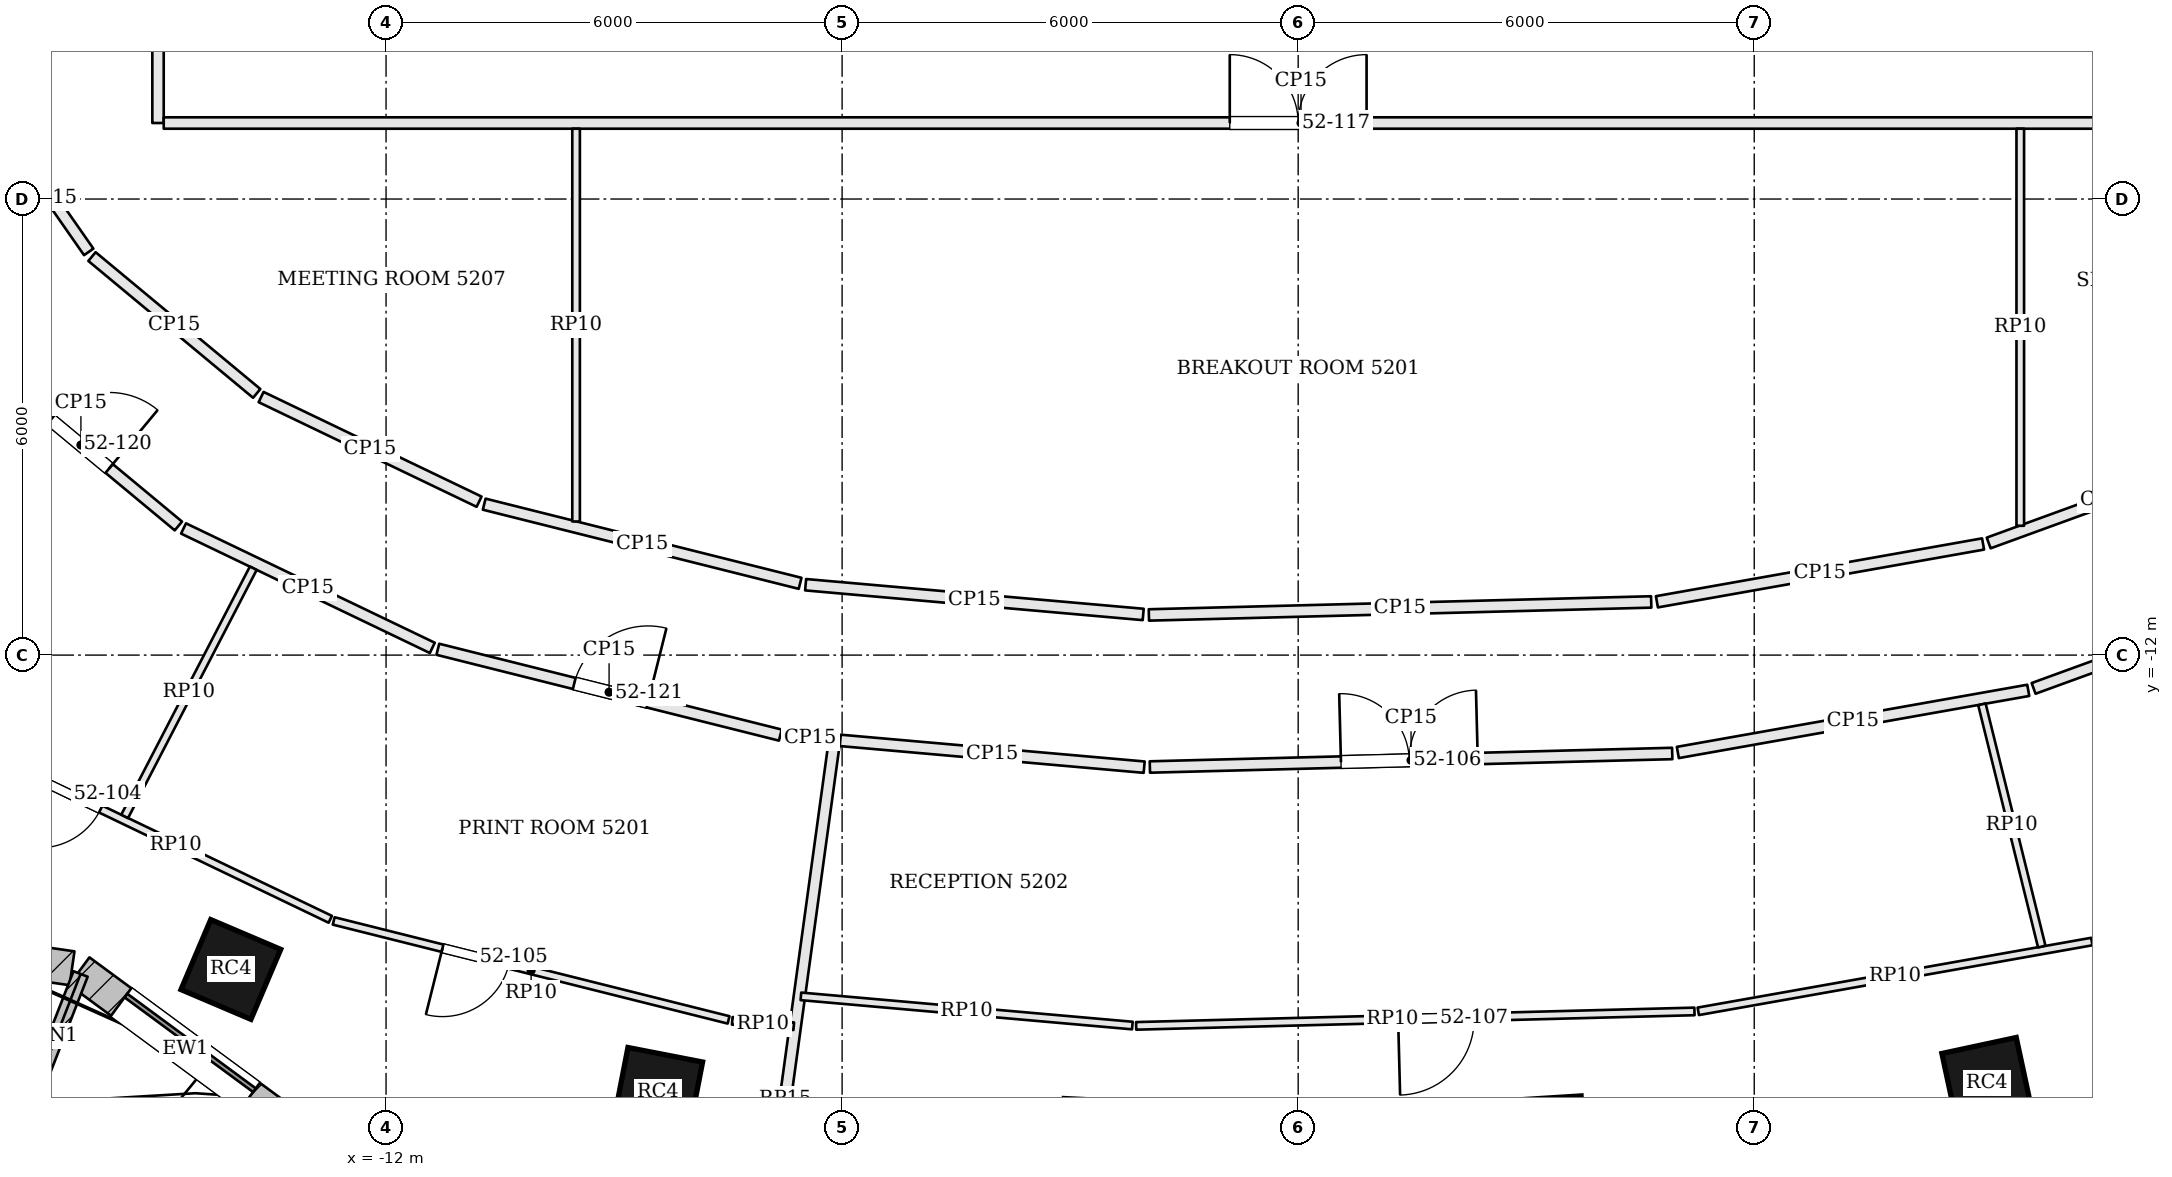
"""IFC4 building model, lengths in metres.
Left out: names, types, materials, properties, quantities, classifications, styles, units other than length and angle.
Written with IfcOpenShell. Run it as: python <this file> out.ifc"""

import sys

from ifc_helpers import new_model, si_unit, direction, frame, frame_2d, origin, origin_2d, place, context, subcontext, project, spatial, rectangle, extrude, element, fill, save


model = new_model("IFC4")
c1 = context("Model", 3, precision=1e-05, world=origin(), true_north=direction((0.0, 1.0)))
c2 = subcontext(c1, "Body", "Model", "MODEL_VIEW")
j1 = project(units=[si_unit("LENGTHUNIT", "METRE"), si_unit("PLANEANGLEUNIT", "RADIAN")], contexts=[c1])
p1 = place(None, origin())
s1 = spatial("IfcSite", under=j1, at=p1, CompositionType="ELEMENT")
p2 = place(p1, origin())
s2 = spatial("IfcBuilding", under=s1, at=p2, CompositionType="ELEMENT")
p3 = place(p2, frame((0.0, 0.0, 213.0)))
s3 = spatial("IfcBuildingStorey", under=s2, at=p3, CompositionType="ELEMENT", Elevation=213.0)
for number, where, z_axis, x_axis in (
    (1, (-14.042, -16.136, 0.0), (0.0, 0.0, 1.0), (0.92, -0.392, 0.0)),
    (2, (-8.422, -17.749, 0.0), (0.0, 0.0, 1.0), (0.982, -0.191, 0.0)),
    (3, (3.254, -18.33, 0.0), (0.0, 0.0, 1.0), (0.998, 0.063, 0.0)),
    (4, (9.063, -17.625, 0.0), (0.0, 0.0, 1.0), (0.978, 0.21, 0.0)),
):
    element("IfcColumn", number, at=place(p3, frame(where, z_axis=z_axis, x_axis=x_axis)), inside=s3, PredefinedType="COLUMN", context=c2, shape_type="SweptSolid", body=[
        extrude(rectangle(XDim=1.0, YDim=1.0, at=origin_2d()), origin(), (0.0, 0.0, 1.0), 3.9),
    ])
p4 = place(p3, frame((-21.825, -15.297, 0.0), z_axis=(0.0, 0.0, 1.0), x_axis=(0.98971474215, -0.143054986527, 0.0)))
e5 = element("IfcWall", 5, at=p4, inside=s3, PredefinedType="SOLIDWALL", context=c2, shape_type="SweptSolid", body=[
    extrude(rectangle(XDim=5.753, YDim=0.45, at=frame_2d((2.876, 0.0))), origin(), (0.0, 0.0, 1.0), 3.6),
])
p5 = place(p4, frame((1.826, 0.0, 0.9)))
e6 = element("IfcOpeningElement", 6, at=p5, cuts=e5, PredefinedType="OPENING", context=c2, shape_type="SweptSolid", body=[
    extrude(rectangle(XDim=2.1, YDim=1.8, at=frame_2d((1.05, 0.9))), frame((0.0, 0.235, 0.0), z_axis=(0.0, -1.0, 0.0), x_axis=(1.0, 0.0, 0.0)), (0.0, 0.0, 1.0), 0.47),
])
p6 = place(p3, frame((-16.036, -16.158, 0.0), z_axis=(0.0, 0.0, 1.0), x_axis=(0.805181432967, -0.593028549064, 0.0)))
e7 = element("IfcWall", 7, at=p6, inside=s3, PredefinedType="SOLIDWALL", context=c2, shape_type="SweptSolid", body=[
    extrude(rectangle(XDim=3.469, YDim=0.45, at=frame_2d((1.734, 0.0))), origin(), (0.0, 0.0, 1.0), 3.6),
])
p7 = place(p6, frame((0.684, 0.0, 0.9)))
e8 = element("IfcOpeningElement", 8, at=p7, cuts=e7, PredefinedType="OPENING", context=c2, shape_type="SweptSolid", body=[
    extrude(rectangle(XDim=2.1, YDim=1.8, at=frame_2d((1.05, 0.9))), frame((0.0, 0.235, 0.0), z_axis=(0.0, -1.0, 0.0), x_axis=(1.0, 0.0, 0.0)), (0.0, 0.0, 1.0), 0.47),
])
p8 = place(p3, frame((-16.019, -16.195, 0.0), z_axis=(0.0, 0.0, 1.0), x_axis=(-0.362641522028, -0.931928713208, 0.0)))
e9 = element("IfcWall", 9, at=p8, inside=s3, PredefinedType="SOLIDWALL", context=c2, shape_type="SweptSolid", body=[
    extrude(rectangle(XDim=1.75, YDim=0.2, at=frame_2d((0.875, 0.0))), origin(), (0.0, 0.0, 1.0), 3.6),
])
p9 = place(p3, frame((-17.297, -8.171, 0.0), z_axis=(0.0, 0.0, 1.0), x_axis=(0.769228575061, -0.638973707839, 0.0)))
e10 = element("IfcWall", 10, at=p9, inside=s3, PredefinedType="PARTITIONING", context=c2, shape_type="SweptSolid", body=[
    extrude(rectangle(XDim=3.334, YDim=0.15, at=frame_2d((1.667, 0.0))), origin(), (0.0, 0.0, 1.0), 2.984),
])
p10 = place(p9, frame((1.15, 0.0, 0.0)))
e11 = element("IfcOpeningElement", 11, at=p10, cuts=e10, PredefinedType="OPENING", context=c2, shape_type="SweptSolid", body=[
    extrude(rectangle(XDim=1.0, YDim=2.1, at=frame_2d((0.5, 1.05))), frame((0.0, 0.085, 0.0), z_axis=(0.0, -1.0, 0.0), x_axis=(1.0, 0.0, 0.0)), (0.0, 0.0, 1.0), 0.17),
])
p11 = place(p3, frame((-14.664, -10.334, 0.0), z_axis=(0.0, 0.0, 1.0), x_axis=(0.901507315282, -0.432763862278, 0.0)))
e12 = element("IfcWall", 12, at=p11, inside=s3, PredefinedType="PARTITIONING", context=c2, shape_type="SweptSolid", body=[
    extrude(rectangle(XDim=3.63, YDim=0.15, at=frame_2d((1.815, 0.0))), origin(), (0.0, 0.0, 1.0), 2.984),
])
p12 = place(p3, frame((-11.319, -11.923, 0.0), z_axis=(0.0, 0.0, 1.0), x_axis=(0.969990815038, -0.243141561114, 0.0)))
e13 = element("IfcWall", 13, at=p12, inside=s3, PredefinedType="PARTITIONING", context=c2, shape_type="SweptSolid", body=[
    extrude(rectangle(XDim=4.645, YDim=0.15, at=frame_2d((2.323, 0.0))), origin(), (0.0, 0.0, 1.0), 2.984),
])
p13 = place(p12, frame((1.85, 0.0, 0.0)))
e14 = element("IfcOpeningElement", 14, at=p13, cuts=e13, PredefinedType="OPENING", context=c2, shape_type="SweptSolid", body=[
    extrude(rectangle(XDim=1.0, YDim=2.1, at=frame_2d((0.5, 1.05))), frame((0.0, 0.085, 0.0), z_axis=(0.0, -1.0, 0.0), x_axis=(1.0, 0.0, 0.0)), (0.0, 0.0, 1.0), 0.17),
])
p14 = place(p3, frame((-6.738, -13.059, 0.0), z_axis=(0.0, 0.0, 1.0), x_axis=(0.996163093105, -0.087516238126, 0.0)))
e15 = element("IfcWall", 15, at=p14, inside=s3, PredefinedType="PARTITIONING", context=c2, shape_type="SweptSolid", body=[
    extrude(rectangle(XDim=0.642, YDim=0.15, at=frame_2d((0.321, 0.0))), origin(), (0.0, 0.0, 1.0), 2.984),
])
p15 = place(p3, frame((-7.385, -22.485, 0.0), z_axis=(0.0, 0.0, 1.0), x_axis=(0.135958487289, 0.990714534936, 0.0)))
e16 = element("IfcWall", 16, at=p15, inside=s3, PredefinedType="PARTITIONING", context=c2, shape_type="SweptSolid", body=[
    extrude(rectangle(XDim=9.383, YDim=0.15, at=frame_2d((4.691, 0.0))), origin(), (0.0, 0.0, 1.0), 3.084),
])
p16 = place(p3, frame((-6.024, -13.122, 0.0), z_axis=(0.0, 0.0, 1.0), x_axis=(0.996140650131, -0.087771323084, 0.0)))
e17 = element("IfcWall", 17, at=p16, inside=s3, PredefinedType="PARTITIONING", context=c2, shape_type="SweptSolid", body=[
    extrude(rectangle(XDim=4.014, YDim=0.15, at=frame_2d((2.007, 0.0))), origin(), (0.0, 0.0, 1.0), 2.984),
])
p17 = place(p3, frame((-1.951, -13.472, 0.0), z_axis=(0.0, 0.0, 1.0), x_axis=(0.999663898238, 0.025924709429, 0.0)))
e18 = element("IfcWall", 18, at=p17, inside=s3, PredefinedType="PARTITIONING", context=c2, shape_type="SweptSolid", body=[
    extrude(rectangle(XDim=6.875, YDim=0.15, at=frame_2d((3.437, 0.0))), origin(), (0.0, 0.0, 1.0), 2.984),
])
p18 = place(p17, frame((2.515, 0.0, 0.0)))
e19 = element("IfcOpeningElement", 19, at=p18, cuts=e18, PredefinedType="OPENING", context=c2, shape_type="SweptSolid", body=[
    extrude(rectangle(XDim=1.8, YDim=2.1, at=frame_2d((0.9, 1.05))), frame((0.0, 0.085, 0.0), z_axis=(0.0, -1.0, 0.0), x_axis=(1.0, 0.0, 0.0)), (0.0, 0.0, 1.0), 0.17),
])
p19 = place(p3, frame((4.995, -13.281, 0.0), z_axis=(0.0, 0.0, 1.0), x_axis=(0.98463411377, 0.174630071865, 0.0)))
e20 = element("IfcWall", 20, at=p19, inside=s3, PredefinedType="PARTITIONING", context=c2, shape_type="SweptSolid", body=[
    extrude(rectangle(XDim=4.682, YDim=0.15, at=frame_2d((2.341, 0.0))), origin(), (0.0, 0.0, 1.0), 2.984),
])
p20 = place(p3, frame((9.676, -12.438, 0.0), z_axis=(0.0, 0.0, 1.0), x_axis=(0.939640289748, 0.342163887461, 0.0)))
e21 = element("IfcWall", 21, at=p20, inside=s3, PredefinedType="PARTITIONING", context=c2, shape_type="SweptSolid", body=[
    extrude(rectangle(XDim=3.68, YDim=0.15, at=frame_2d((1.84, 0.0))), origin(), (0.0, 0.0, 1.0), 2.984),
])
p21 = place(p3, frame((12.178, -9.398, 0.0), z_axis=(0.0, 0.0, 1.0), x_axis=(-0.939609240084, -0.342249143093, 0.0)))
e22 = element("IfcWall", 22, at=p21, inside=s3, PredefinedType="PARTITIONING", context=c2, shape_type="SweptSolid", body=[
    extrude(rectangle(XDim=3.292, YDim=0.15, at=frame_2d((1.646, 0.0))), origin(), (0.0, 0.0, 1.0), 2.984),
])
p22 = place(p3, frame((9.01, -10.538, 0.0), z_axis=(0.0, 0.0, 1.0), x_axis=(-0.984645638575, -0.174565077936, 0.0)))
e23 = element("IfcWall", 23, at=p22, inside=s3, PredefinedType="PARTITIONING", context=c2, shape_type="SweptSolid", body=[
    extrude(rectangle(XDim=4.358, YDim=0.15, at=frame_2d((2.179, 0.0))), origin(), (0.0, 0.0, 1.0), 2.984),
])
p23 = place(p3, frame((4.645, -11.301, 0.0), z_axis=(0.0, 0.0, 1.0), x_axis=(-0.9996648469, -0.02588810291, 0.0)))
e24 = element("IfcWall", 24, at=p23, inside=s3, PredefinedType="PARTITIONING", context=c2, shape_type="SweptSolid", body=[
    extrude(rectangle(XDim=6.611, YDim=0.15, at=frame_2d((3.305, 0.0))), origin(), (0.0, 0.0, 1.0), 2.984),
])
p24 = place(p3, frame((-2.039, -11.465, 0.0), z_axis=(0.0, 0.0, 1.0), x_axis=(-0.996139855484, 0.087780341286, 0.0)))
e25 = element("IfcWall", 25, at=p24, inside=s3, PredefinedType="PARTITIONING", context=c2, shape_type="SweptSolid", body=[
    extrude(rectangle(XDim=4.458, YDim=0.15, at=frame_2d((2.229, 0.0))), origin(), (0.0, 0.0, 1.0), 2.984),
])
p25 = place(p3, frame((-6.553, -11.056, 0.0), z_axis=(0.0, 0.0, 1.0), x_axis=(-0.970004917182, 0.243085294995, 0.0)))
e26 = element("IfcWall", 26, at=p25, inside=s3, PredefinedType="PARTITIONING", context=c2, shape_type="SweptSolid", body=[
    extrude(rectangle(XDim=4.284, YDim=0.15, at=frame_2d((2.142, 0.0))), origin(), (0.0, 0.0, 1.0), 2.984),
])
p26 = place(p3, frame((-10.776, -9.982, 0.0), z_axis=(0.0, 0.0, 1.0), x_axis=(-0.901511079436, 0.432756020933, 0.0)))
e27 = element("IfcWall", 27, at=p26, inside=s3, PredefinedType="PARTITIONING", context=c2, shape_type="SweptSolid", body=[
    extrude(rectangle(XDim=3.181, YDim=0.15, at=frame_2d((1.59, 0.0))), origin(), (0.0, 0.0, 1.0), 2.984),
])
p27 = place(p3, frame((-13.702, -8.557, 0.0), z_axis=(0.0, 0.0, 1.0), x_axis=(-0.769221825067, 0.638981833733, 0.0)))
e28 = element("IfcWall", 28, at=p27, inside=s3, PredefinedType="PARTITIONING", context=c2, shape_type="SweptSolid", body=[
    extrude(rectangle(XDim=2.817, YDim=0.15, at=frame_2d((1.409, 0.0))), origin(), (0.0, 0.0, 1.0), 2.984),
])
p28 = place(p3, frame((-15.912, -6.696, 0.0), z_axis=(0.0, 0.0, 1.0), x_axis=(-0.572078533763, 0.820198848578, 0.0)))
e29 = element("IfcWall", 29, at=p28, inside=s3, PredefinedType="PARTITIONING", context=c2, shape_type="SweptSolid", body=[
    extrude(rectangle(XDim=1.742, YDim=0.15, at=frame_2d((0.871, 0.0))), origin(), (0.0, 0.0, 1.0), 2.984),
])
p29 = place(p3, frame((-15.0, 7.423, 0.0), z_axis=(0.0, 0.0, 1.0), x_axis=(0.0, -1.0, 0.0)))
e30 = element("IfcWall", 30, at=p29, inside=s3, PredefinedType="PARTITIONING", context=c2, shape_type="SweptSolid", body=[
    extrude(rectangle(XDim=12.423, YDim=0.15, at=frame_2d((6.211, 0.0))), origin(), (0.0, 0.0, 1.0), 2.984),
])
p30 = place(p29, frame((5.674, 0.0, 0.0)))
e31 = element("IfcOpeningElement", 31, at=p30, cuts=e30, PredefinedType="OPENING", context=c2, shape_type="SweptSolid", body=[
    extrude(rectangle(XDim=1.0, YDim=2.4, at=frame_2d((0.5, 1.2))), frame((0.0, 0.085, 0.0), z_axis=(0.0, -1.0, 0.0), x_axis=(1.0, 0.0, 0.0)), (0.0, 0.0, 1.0), 0.17),
])
p31 = place(p3, frame((-14.925, -5.0, 0.0), z_axis=(0.0, 0.0, 1.0), x_axis=(1.0, 0.0, 0.0)))
e32 = element("IfcWall", 32, at=p31, inside=s3, PredefinedType="PARTITIONING", context=c2, shape_type="SweptSolid", body=[
    extrude(rectangle(XDim=29.925, YDim=0.15, at=frame_2d((14.962, 0.0))), origin(), (0.0, 0.0, 1.0), 2.984),
])
p32 = place(p31, frame((14.025, 0.0, 0.0)))
e33 = element("IfcOpeningElement", 33, at=p32, cuts=e32, PredefinedType="OPENING", context=c2, shape_type="SweptSolid", body=[
    extrude(rectangle(XDim=1.8, YDim=2.1, at=frame_2d((0.9, 1.05))), frame((0.0, 0.085, 0.0), z_axis=(0.0, -1.0, 0.0), x_axis=(1.0, 0.0, 0.0)), (0.0, 0.0, 1.0), 0.17),
])
p33 = place(p3, frame((-6.636, -16.883, 0.0), z_axis=(0.0, 0.0, 1.0), x_axis=(-0.996140679017, 0.087770995254, 0.0)))
e34 = element("IfcWall", 34, at=p33, inside=s3, PredefinedType="PARTITIONING", context=c2, shape_type="SweptSolid", body=[
    extrude(rectangle(XDim=0.812, YDim=0.1, at=frame_2d((0.406, 0.0))), origin(), (0.0, 0.0, 1.0), 2.984),
])
p34 = place(p3, frame((-7.494, -16.799, 0.0), z_axis=(0.0, 0.0, 1.0), x_axis=(-0.969997521867, 0.243114803276, 0.0)))
e35 = element("IfcWall", 35, at=p34, inside=s3, PredefinedType="PARTITIONING", context=c2, shape_type="SweptSolid", body=[
    extrude(rectangle(XDim=5.355, YDim=0.1, at=frame_2d((2.678, 0.0))), origin(), (0.0, 0.0, 1.0), 2.984),
])
p35 = place(p34, frame((2.98, 0.0, 0.0)))
e36 = element("IfcOpeningElement", 36, at=p35, cuts=e35, PredefinedType="OPENING", context=c2, shape_type="SweptSolid", body=[
    extrude(rectangle(XDim=0.9, YDim=2.1, at=frame_2d((0.45, 1.05))), frame((0.0, 0.06, 0.0), z_axis=(0.0, -1.0, 0.0), x_axis=(1.0, 0.0, 0.0)), (0.0, 0.0, 1.0), 0.12),
])
p36 = place(p3, frame((-12.734, -15.476, 0.0), z_axis=(0.0, 0.0, 1.0), x_axis=(-0.901501091464, 0.432776827117, 0.0)))
e37 = element("IfcWall", 37, at=p36, inside=s3, PredefinedType="PARTITIONING", context=c2, shape_type="SweptSolid", body=[
    extrude(rectangle(XDim=4.51, YDim=0.1, at=frame_2d((2.255, 0.0))), origin(), (0.0, 0.0, 1.0), 2.984),
])
p37 = place(p36, frame((3.35, 0.0, 0.0)))
e38 = element("IfcOpeningElement", 38, at=p37, cuts=e37, PredefinedType="OPENING", context=c2, shape_type="SweptSolid", body=[
    extrude(rectangle(XDim=0.9, YDim=2.1, at=frame_2d((0.45, 1.05))), frame((0.0, 0.06, 0.0), z_axis=(0.0, -1.0, 0.0), x_axis=(1.0, 0.0, 0.0)), (0.0, 0.0, 1.0), 0.12),
])
p38 = place(p3, frame((-13.747, -10.857, 0.0), z_axis=(0.0, 0.0, 1.0), x_axis=(-0.460154350261, -0.887838934681, 0.0)))
e39 = element("IfcWall", 39, at=p38, inside=s3, PredefinedType="PARTITIONING", context=c2, shape_type="SweptSolid", body=[
    extrude(rectangle(XDim=3.677, YDim=0.1, at=frame_2d((1.838, 0.0))), origin(), (0.0, 0.0, 1.0), 2.984),
])
p39 = place(p3, frame((10.441, -15.769, 0.0), z_axis=(0.0, 0.0, 1.0), x_axis=(-0.984642067447, -0.174585219919, 0.0)))
e40 = element("IfcWall", 40, at=p39, inside=s3, PredefinedType="PARTITIONING", context=c2, shape_type="SweptSolid", body=[
    extrude(rectangle(XDim=5.258, YDim=0.1, at=frame_2d((2.629, 0.0))), origin(), (0.0, 0.0, 1.0), 2.984),
])
p40 = place(p3, frame((5.214, -16.688, 0.0), z_axis=(0.0, 0.0, 1.0), x_axis=(-0.999664981446, -0.025882906921, 0.0)))
e41 = element("IfcWall", 41, at=p40, inside=s3, PredefinedType="PARTITIONING", context=c2, shape_type="SweptSolid", body=[
    extrude(rectangle(XDim=7.348, YDim=0.1, at=frame_2d((3.674, 0.0))), origin(), (0.0, 0.0, 1.0), 2.984),
])
p41 = place(p40, frame((2.9, 0.0, 0.0)))
e42 = element("IfcOpeningElement", 42, at=p41, cuts=e41, PredefinedType="OPENING", context=c2, shape_type="SweptSolid", body=[
    extrude(rectangle(XDim=1.0, YDim=2.1, at=frame_2d((0.5, 1.05))), frame((0.0, 0.06, 0.0), z_axis=(0.0, -1.0, 0.0), x_axis=(1.0, 0.0, 0.0)), (0.0, 0.0, 1.0), 0.12),
])
p42 = place(p3, frame((-2.181, -16.874, 0.0), z_axis=(0.0, 0.0, 1.0), x_axis=(-0.996144341977, 0.087729413243, 0.0)))
e43 = element("IfcWall", 43, at=p42, inside=s3, PredefinedType="PARTITIONING", context=c2, shape_type="SweptSolid", body=[
    extrude(rectangle(XDim=4.377, YDim=0.1, at=frame_2d((2.189, 0.0))), origin(), (0.0, 0.0, 1.0), 2.984),
])
p43 = place(p3, frame((8.995, -12.648, 0.0), z_axis=(0.0, 0.0, 1.0), x_axis=(0.239839908092, -0.970812452787, 0.0)))
e44 = element("IfcWall", 44, at=p43, inside=s3, PredefinedType="PARTITIONING", context=c2, shape_type="SweptSolid", body=[
    extrude(rectangle(XDim=3.283, YDim=0.1, at=frame_2d((1.641, 0.0))), origin(), (0.0, 0.0, 1.0), 2.984),
])
p44 = place(p3, frame((-9.5, -10.242, 0.0), z_axis=(0.0, 0.0, 1.0), x_axis=(0.0, 1.0, 0.0)))
e45 = element("IfcWall", 45, at=p44, inside=s3, PredefinedType="PARTITIONING", context=c2, shape_type="SweptSolid", body=[
    extrude(rectangle(XDim=5.167, YDim=0.1, at=frame_2d((2.583, 0.0))), origin(), (0.0, 0.0, 1.0), 2.984),
])
p45 = place(p3, frame((9.5, -10.299, 0.0), z_axis=(0.0, 0.0, 1.0), x_axis=(0.0, 1.0, 0.0)))
e46 = element("IfcWall", 46, at=p45, inside=s3, PredefinedType="PARTITIONING", context=c2, shape_type="SweptSolid", body=[
    extrude(rectangle(XDim=5.224, YDim=0.1, at=frame_2d((2.612, 0.0))), origin(), (0.0, 0.0, 1.0), 2.984),
])
p46 = place(p7, origin())
e47 = element("IfcWindow", 47, at=p46, inside=s3, PartitioningType="SINGLE_PANEL", PredefinedType="WINDOW", context=c2, shape_type="SweptSolid", body=[
    extrude(rectangle(XDim=2.1, YDim=1.8, at=frame_2d((1.05, 0.9))), frame((0.0, 0.135, 0.0), z_axis=(0.0, -1.0, 0.0), x_axis=(1.0, 0.0, 0.0)), (0.0, 0.0, 1.0), 0.06),
])
fill(e8, e47)
p47 = place(p37, origin())
e48 = element("IfcDoor", 48, at=p47, inside=s3, OperationType="SINGLE_SWING_RIGHT", PredefinedType="DOOR", context=c2, shape_type="SweptSolid", body=[
    extrude(rectangle(XDim=0.9, YDim=2.1, at=frame_2d((0.45, 1.05))), frame((0.0, 0.025, 0.0), z_axis=(0.0, -1.0, 0.0), x_axis=(1.0, 0.0, 0.0)), (0.0, 0.0, 1.0), 0.05),
])
fill(e38, e48)
p48 = place(p35, origin())
e49 = element("IfcDoor", 49, at=p48, inside=s3, OperationType="SINGLE_SWING_RIGHT", PredefinedType="DOOR", context=c2, shape_type="SweptSolid", body=[
    extrude(rectangle(XDim=0.9, YDim=2.1, at=frame_2d((0.45, 1.05))), frame((0.0, 0.025, 0.0), z_axis=(0.0, -1.0, 0.0), x_axis=(1.0, 0.0, 0.0)), (0.0, 0.0, 1.0), 0.05),
])
fill(e36, e49)
p49 = place(p18, origin())
e50 = element("IfcDoor", 50, at=p49, inside=s3, OperationType="DOUBLE_DOOR_SINGLE_SWING", PredefinedType="DOOR", context=c2, shape_type="SweptSolid", body=[
    extrude(rectangle(XDim=1.8, YDim=2.1, at=frame_2d((0.9, 1.05))), frame((0.0, 0.025, 0.0), z_axis=(0.0, -1.0, 0.0), x_axis=(1.0, 0.0, 0.0)), (0.0, 0.0, 1.0), 0.05),
])
fill(e19, e50)
p50 = place(p41, origin())
e51 = element("IfcDoor", 51, at=p50, inside=s3, OperationType="SINGLE_SWING_RIGHT", PredefinedType="DOOR", context=c2, shape_type="SweptSolid", body=[
    extrude(rectangle(XDim=1.0, YDim=2.1, at=frame_2d((0.5, 1.05))), frame((0.0, 0.025, 0.0), z_axis=(0.0, -1.0, 0.0), x_axis=(1.0, 0.0, 0.0)), (0.0, 0.0, 1.0), 0.05),
])
fill(e42, e51)
p51 = place(p32, origin())
e52 = element("IfcDoor", 52, at=p51, inside=s3, OperationType="DOUBLE_DOOR_SINGLE_SWING", PredefinedType="DOOR", context=c2, shape_type="SweptSolid", body=[
    extrude(rectangle(XDim=1.8, YDim=2.1, at=frame_2d((0.9, 1.05))), frame((0.0, 0.025, 0.0), z_axis=(0.0, -1.0, 0.0), x_axis=(1.0, 0.0, 0.0)), (0.0, 0.0, 1.0), 0.05),
])
fill(e33, e52)
p52 = place(p10, origin())
e53 = element("IfcDoor", 53, at=p52, inside=s3, OperationType="SINGLE_SWING_RIGHT", PredefinedType="DOOR", context=c2, shape_type="SweptSolid", body=[
    extrude(rectangle(XDim=1.0, YDim=2.1, at=frame_2d((0.5, 1.05))), frame((0.0, 0.025, 0.0), z_axis=(0.0, -1.0, 0.0), x_axis=(1.0, 0.0, 0.0)), (0.0, 0.0, 1.0), 0.05),
])
fill(e11, e53)
p53 = place(p13, origin())
e54 = element("IfcDoor", 54, at=p53, inside=s3, OperationType="SINGLE_SWING_RIGHT", PredefinedType="DOOR", context=c2, shape_type="SweptSolid", body=[
    extrude(rectangle(XDim=1.0, YDim=2.1, at=frame_2d((0.5, 1.05))), frame((0.0, 0.025, 0.0), z_axis=(0.0, -1.0, 0.0), x_axis=(1.0, 0.0, 0.0)), (0.0, 0.0, 1.0), 0.05),
])
fill(e14, e54)
save(model, sys.argv[1])
